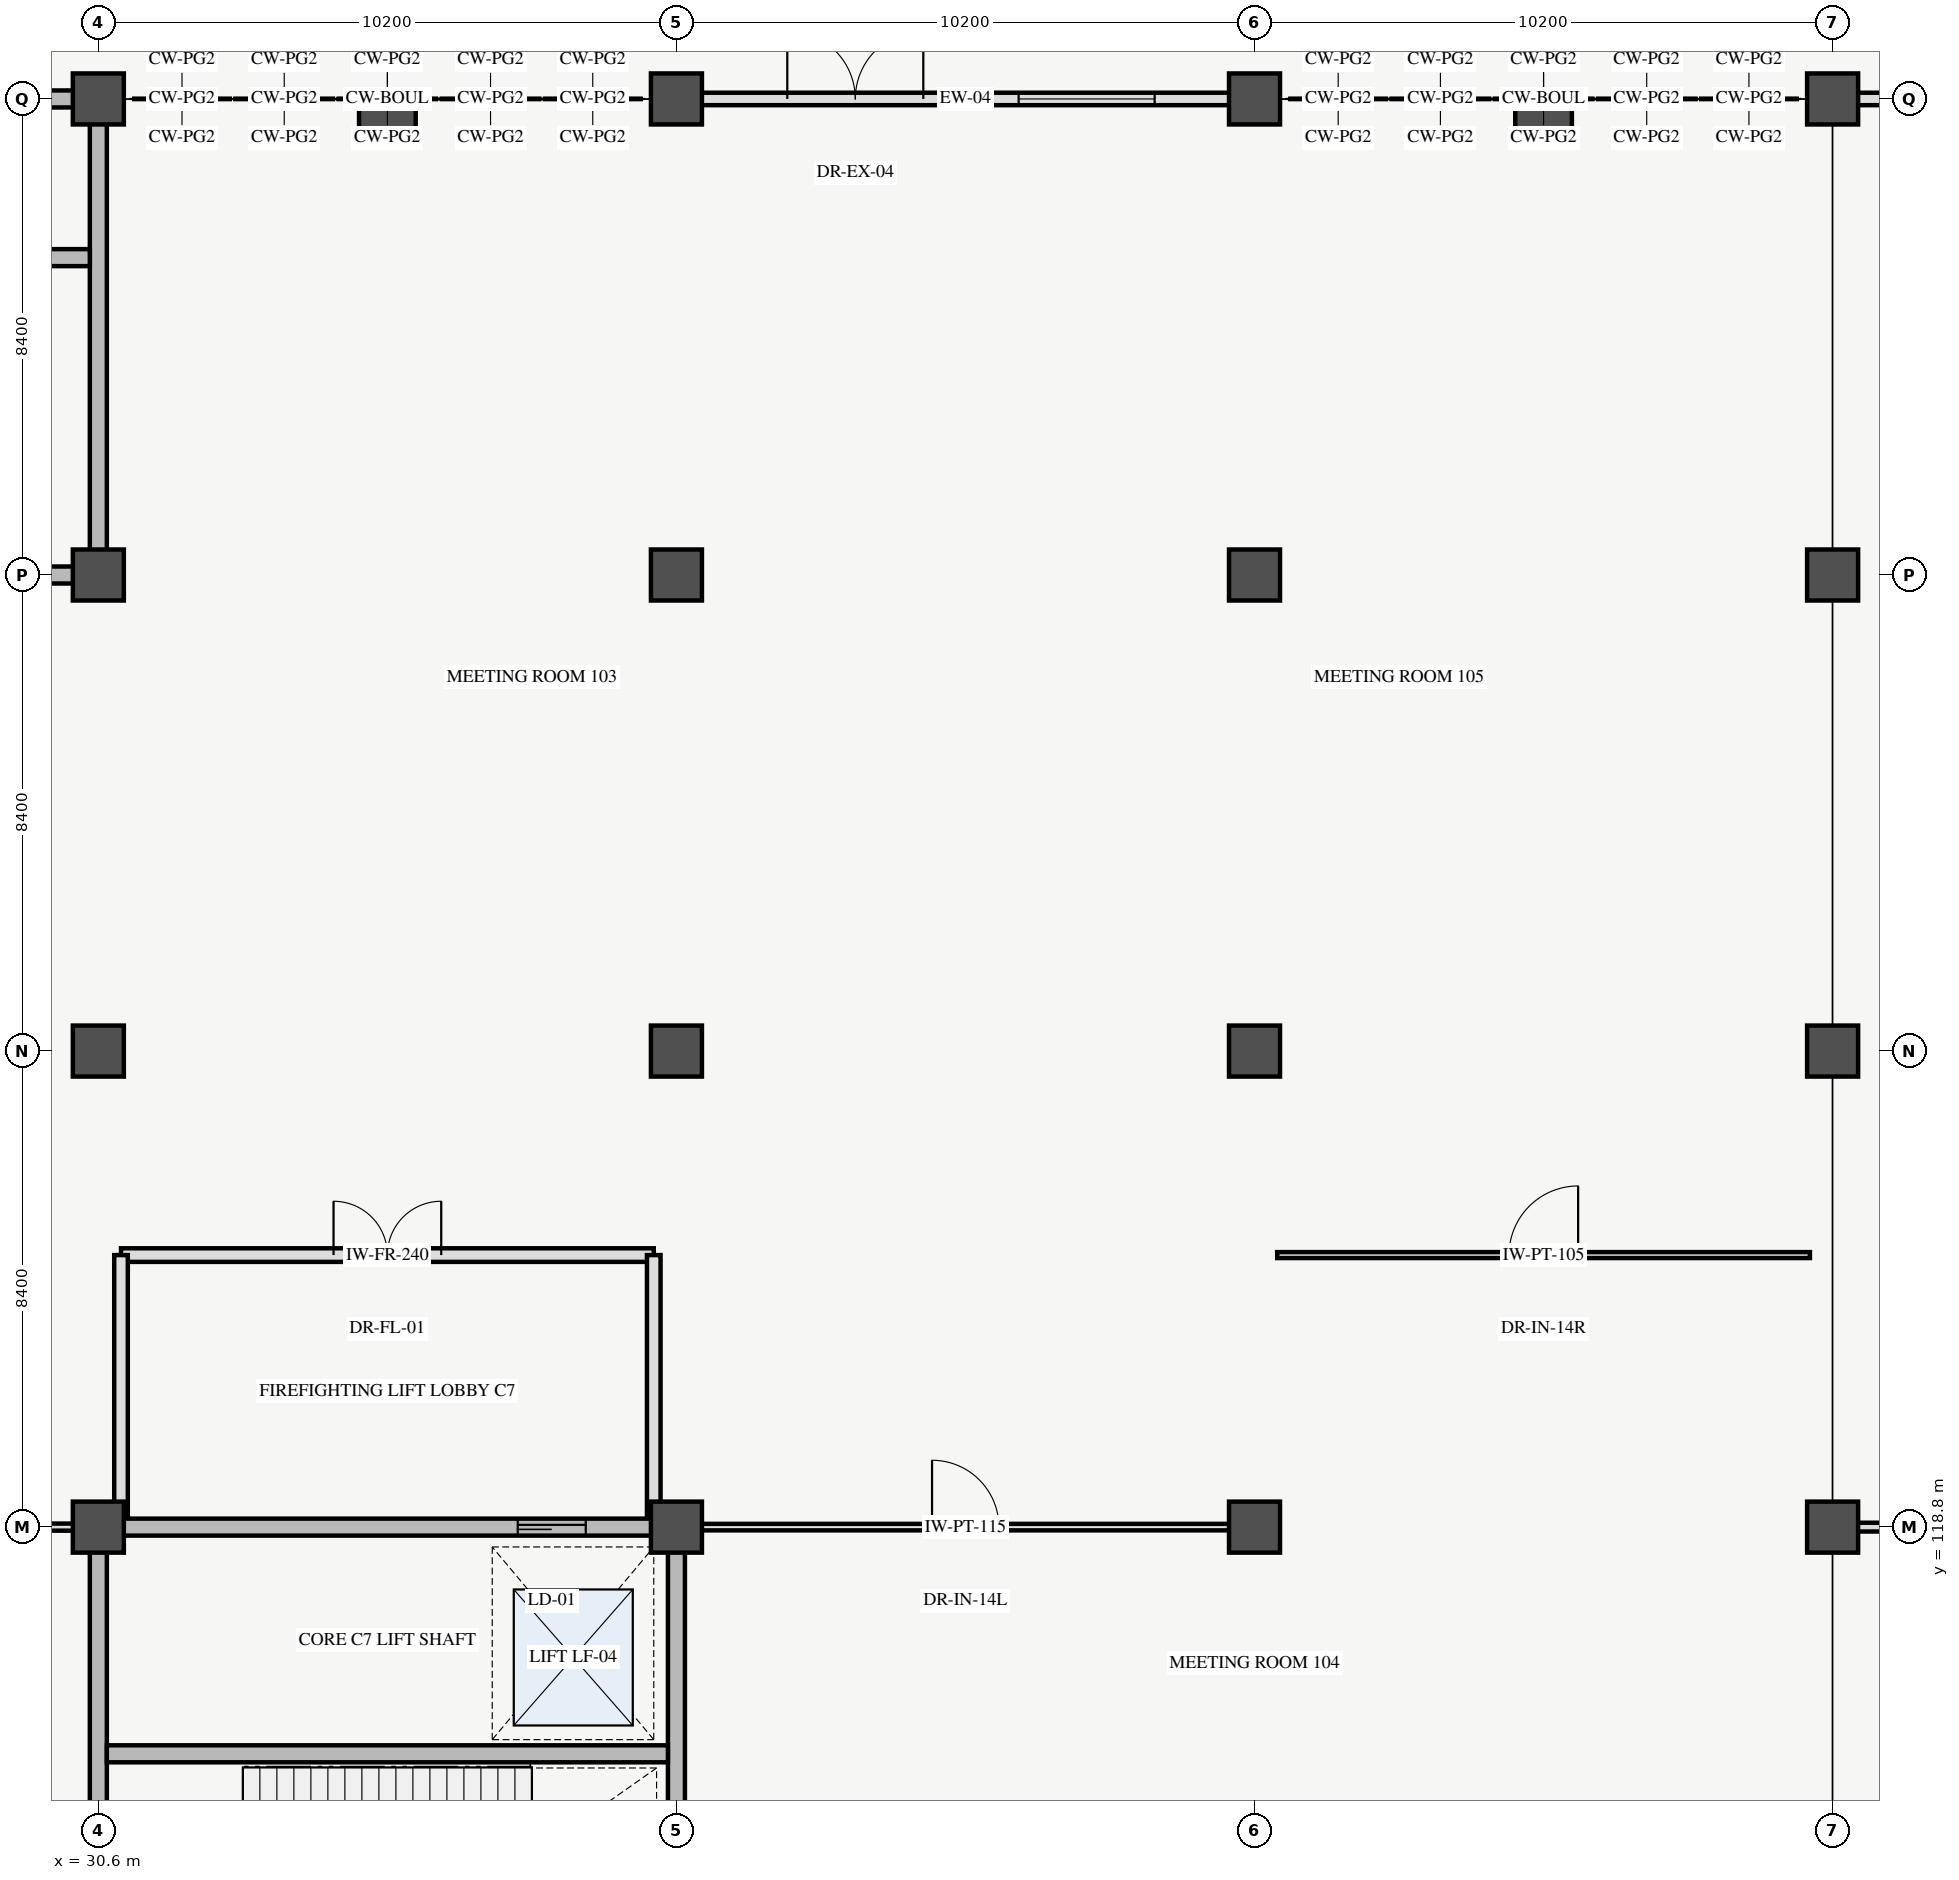
"""IFC4 building model, lengths in metres.
Left out: names, types, materials, properties, quantities, classifications, styles, units other than length and angle.
Written with IfcOpenShell. Run it as: python <this file> out.ifc"""

import sys

from ifc_helpers import new_model, si_unit, direction, frame, frame_2d, origin, origin_2d, place, context, subcontext, project, spatial, rectangle, extrude, element, fill, save


model = new_model("IFC4")
c1 = context("Model", 3, precision=1e-05, world=origin(), true_north=direction((0.0, 1.0)))
c2 = subcontext(c1, "Body", "Model", "MODEL_VIEW")
j1 = project(units=[si_unit("LENGTHUNIT", "METRE"), si_unit("PLANEANGLEUNIT", "RADIAN")], contexts=[c1])
p1 = place(None, origin())
s1 = spatial("IfcSite", under=j1, at=p1, CompositionType="ELEMENT")
p2 = place(p1, origin())
s2 = spatial("IfcBuilding", under=s1, at=p2, CompositionType="ELEMENT")
p3 = place(p2, origin())
s3 = spatial("IfcBuildingStorey", under=s2, at=p3, CompositionType="ELEMENT", Elevation=0.0)
for number, where, z_axis, x_axis in (
    (1, (30.6, 118.8, 0.0), (0.0, 0.0, 1.0), (1.0, 0.0, 0.0)),
    (2, (30.6, 127.2, 0.0), (0.0, 0.0, 1.0), (1.0, 0.0, 0.0)),
    (3, (30.6, 135.6, 0.0), (0.0, 0.0, 1.0), (1.0, 0.0, 0.0)),
    (4, (30.6, 144.0, 0.0), (0.0, 0.0, 1.0), (1.0, 0.0, 0.0)),
    (5, (40.8, 118.8, 0.0), (0.0, 0.0, 1.0), (1.0, 0.0, 0.0)),
    (6, (40.8, 127.2, 0.0), (0.0, 0.0, 1.0), (1.0, 0.0, 0.0)),
    (7, (40.8, 135.6, 0.0), (0.0, 0.0, 1.0), (1.0, 0.0, 0.0)),
    (8, (40.8, 144.0, 0.0), (0.0, 0.0, 1.0), (1.0, 0.0, 0.0)),
    (9, (51.0, 118.8, 0.0), (0.0, 0.0, 1.0), (1.0, 0.0, 0.0)),
    (10, (51.0, 127.2, 0.0), (0.0, 0.0, 1.0), (1.0, 0.0, 0.0)),
    (11, (51.0, 135.6, 0.0), (0.0, 0.0, 1.0), (1.0, 0.0, 0.0)),
    (12, (51.0, 144.0, 0.0), (0.0, 0.0, 1.0), (1.0, 0.0, 0.0)),
    (13, (61.2, 118.8, 0.0), (0.0, 0.0, 1.0), (1.0, 0.0, 0.0)),
    (14, (61.2, 127.2, 0.0), (0.0, 0.0, 1.0), (1.0, 0.0, 0.0)),
    (15, (61.2, 135.6, 0.0), (0.0, 0.0, 1.0), (1.0, 0.0, 0.0)),
    (16, (61.2, 144.0, 0.0), (0.0, 0.0, 1.0), (1.0, 0.0, 0.0)),
):
    element("IfcColumn", number, at=place(p3, frame(where, z_axis=z_axis, x_axis=x_axis)), inside=s3, PredefinedType="COLUMN", context=c2, shape_type="SweptSolid", body=[
        extrude(rectangle(XDim=0.9, YDim=0.9, at=origin_2d()), origin(), (0.0, 0.0, 1.0), 5.4),
    ])
for number, where, z_axis, x_axis in (
    (17, (35.7, 143.7, 0.0), (0.0, 0.0, 1.0), (1.0, 0.0, 0.0)),
    (18, (56.1, 143.7, 0.0), (0.0, 0.0, 1.0), (1.0, 0.0, 0.0)),
):
    element("IfcColumn", number, at=place(p3, frame(where, z_axis=z_axis, x_axis=x_axis)), inside=s3, PredefinedType="PILASTER", context=c2, shape_type="SweptSolid", body=[
        extrude(rectangle(XDim=1.0, YDim=0.6, at=origin_2d()), origin(), (0.0, 0.0, 1.0), 5.4),
    ])
p4 = place(p3, frame((30.6, 118.8, 0.0), z_axis=(0.0, 0.0, 1.0), x_axis=(1.0, 0.0, 0.0)))
e19 = element("IfcWall", 19, at=p4, inside=s3, PredefinedType="SHEAR", context=c2, shape_type="SweptSolid", body=[
    extrude(rectangle(XDim=10.2, YDim=0.3, at=frame_2d((5.1, 0.0))), origin(), (0.0, 0.0, 1.0), 5.4),
])
p5 = place(p4, frame((7.4, 0.0, 0.0)))
e20 = element("IfcOpeningElement", 20, at=p5, cuts=e19, PredefinedType="OPENING", context=c2, shape_type="SweptSolid", body=[
    extrude(rectangle(XDim=1.2, YDim=2.25, at=frame_2d((0.6, 1.125))), frame((0.0, 0.16, 0.0), z_axis=(0.0, -1.0, 0.0), x_axis=(1.0, 0.0, 0.0)), (0.0, 0.0, 1.0), 0.32),
])
for number, where, z_axis, x_axis in (
    (21, (30.6, 109.2, 0.0), (0.0, 0.0, 1.0), (0.0, 1.0, 0.0)),
    (22, (40.8, 109.2, 0.0), (0.0, 0.0, 1.0), (0.0, 1.0, 0.0)),
):
    element("IfcWall", number, at=place(p3, frame(where, z_axis=z_axis, x_axis=x_axis)), inside=s3, PredefinedType="SHEAR", context=c2, shape_type="SweptSolid", body=[
        extrude(rectangle(XDim=9.6, YDim=0.3, at=frame_2d((4.8, 0.0))), origin(), (0.0, 0.0, 1.0), 5.4),
    ])
p6 = place(p3, frame((41.04, 144.0, 0.0), z_axis=(0.0, 0.0, 1.0), x_axis=(1.0, 0.0, 0.0)))
e23 = element("IfcWall", 23, at=p6, inside=s3, PredefinedType="STANDARD", context=c2, shape_type="SweptSolid", body=[
    extrude(rectangle(XDim=9.72, YDim=0.22, at=frame_2d((4.86, 0.0))), origin(), (0.0, 0.0, 1.0), 3.68),
])
p7 = place(p6, frame((1.716, 0.0, 0.0)))
e24 = element("IfcOpeningElement", 24, at=p7, cuts=e23, PredefinedType="OPENING", context=c2, shape_type="SweptSolid", body=[
    extrude(rectangle(XDim=2.4, YDim=2.4, at=frame_2d((1.2, 1.2))), frame((0.0, 0.12, 0.0), z_axis=(0.0, -1.0, 0.0), x_axis=(1.0, 0.0, 0.0)), (0.0, 0.0, 1.0), 0.24),
])
p8 = place(p6, frame((5.798, 0.0, 0.7)))
e25 = element("IfcOpeningElement", 25, at=p8, cuts=e23, PredefinedType="OPENING", context=c2, shape_type="SweptSolid", body=[
    extrude(rectangle(XDim=2.4, YDim=2.1, at=frame_2d((1.2, 1.05))), frame((0.0, 0.12, 0.0), z_axis=(0.0, -1.0, 0.0), x_axis=(1.0, 0.0, 0.0)), (0.0, 0.0, 1.0), 0.24),
])
p9 = place(p3, frame((61.44, 144.0, 0.0), z_axis=(0.0, 0.0, 1.0), x_axis=(1.0, 0.0, 0.0)))
e26 = element("IfcWall", 26, at=p9, inside=s3, PredefinedType="STANDARD", context=c2, shape_type="SweptSolid", body=[
    extrude(rectangle(XDim=9.72, YDim=0.22, at=frame_2d((4.86, 0.0))), origin(), (0.0, 0.0, 1.0), 3.68),
])
p10 = place(p9, frame((1.716, 0.0, 0.0)))
e27 = element("IfcOpeningElement", 27, at=p10, cuts=e26, PredefinedType="OPENING", context=c2, shape_type="SweptSolid", body=[
    extrude(rectangle(XDim=2.4, YDim=2.4, at=frame_2d((1.2, 1.2))), frame((0.0, 0.12, 0.0), z_axis=(0.0, -1.0, 0.0), x_axis=(1.0, 0.0, 0.0)), (0.0, 0.0, 1.0), 0.24),
])
p11 = place(p9, frame((5.798, 0.0, 0.7)))
e28 = element("IfcOpeningElement", 28, at=p11, cuts=e26, PredefinedType="OPENING", context=c2, shape_type="SweptSolid", body=[
    extrude(rectangle(XDim=2.4, YDim=2.1, at=frame_2d((1.2, 1.05))), frame((0.0, 0.12, 0.0), z_axis=(0.0, -1.0, 0.0), x_axis=(1.0, 0.0, 0.0)), (0.0, 0.0, 1.0), 0.24),
])
p12 = place(p3, frame((30.75, 114.8, 0.0), z_axis=(0.0, 0.0, 1.0), x_axis=(1.0, 0.0, 0.0)))
e29 = element("IfcWall", 29, at=p12, inside=s3, PredefinedType="SHEAR", context=c2, shape_type="SweptSolid", body=[
    extrude(rectangle(XDim=9.9, YDim=0.3, at=frame_2d((4.95, 0.0))), origin(), (0.0, 0.0, 1.0), 5.4),
])
p13 = place(p3, frame((20.4, 135.6, 0.0), z_axis=(0.0, 0.0, 1.0), x_axis=(1.0, 0.0, 0.0)))
e30 = element("IfcWall", 30, at=p13, inside=s3, PredefinedType="SHEAR", context=c2, shape_type="SweptSolid", body=[
    extrude(rectangle(XDim=10.2, YDim=0.3, at=frame_2d((5.1, 0.0))), origin(), (0.0, 0.0, 1.0), 5.4),
])
p14 = place(p13, frame((0.92, 0.0, 0.0)))
e31 = element("IfcOpeningElement", 31, at=p14, cuts=e30, PredefinedType="OPENING", context=c2, shape_type="SweptSolid", body=[
    extrude(rectangle(XDim=1.16, YDim=2.2, at=frame_2d((0.58, 1.1))), frame((0.0, 0.16, 0.0), z_axis=(0.0, -1.0, 0.0), x_axis=(1.0, 0.0, 0.0)), (0.0, 0.0, 1.0), 0.32),
])
p15 = place(p3, frame((20.4, 144.0, 0.0), z_axis=(0.0, 0.0, 1.0), x_axis=(1.0, 0.0, 0.0)))
e32 = element("IfcWall", 32, at=p15, inside=s3, PredefinedType="SHEAR", context=c2, shape_type="SweptSolid", body=[
    extrude(rectangle(XDim=10.2, YDim=0.3, at=frame_2d((5.1, 0.0))), origin(), (0.0, 0.0, 1.0), 5.4),
])
p16 = place(p15, frame((0.95, 0.0, 0.0)))
e33 = element("IfcOpeningElement", 33, at=p16, cuts=e32, PredefinedType="OPENING", context=c2, shape_type="SweptSolid", body=[
    extrude(rectangle(XDim=1.2, YDim=2.2, at=frame_2d((0.6, 1.1))), frame((0.0, 0.16, 0.0), z_axis=(0.0, -1.0, 0.0), x_axis=(1.0, 0.0, 0.0)), (0.0, 0.0, 1.0), 0.32),
])
p17 = place(p3, frame((30.6, 135.6, 0.0), z_axis=(0.0, 0.0, 1.0), x_axis=(0.0, 1.0, 0.0)))
e34 = element("IfcWall", 34, at=p17, inside=s3, PredefinedType="SHEAR", context=c2, shape_type="SweptSolid", body=[
    extrude(rectangle(XDim=8.4, YDim=0.3, at=frame_2d((4.2, 0.0))), origin(), (0.0, 0.0, 1.0), 5.4),
])
p18 = place(p3, frame((20.55, 141.2, 0.0), z_axis=(0.0, 0.0, 1.0), x_axis=(1.0, 0.0, 0.0)))
e35 = element("IfcWall", 35, at=p18, inside=s3, PredefinedType="SHEAR", context=c2, shape_type="SweptSolid", body=[
    extrude(rectangle(XDim=9.9, YDim=0.3, at=frame_2d((4.95, 0.0))), origin(), (0.0, 0.0, 1.0), 5.4),
])
p19 = place(p3, frame((31.0, 123.6, 0.0), z_axis=(0.0, 0.0, 1.0), x_axis=(1.0, 0.0, 0.0)))
e36 = element("IfcWall", 36, at=p19, inside=s3, PredefinedType="PARTITIONING", context=c2, shape_type="SweptSolid", body=[
    extrude(rectangle(XDim=9.4, YDim=0.24, at=frame_2d((4.7, 0.0))), origin(), (0.0, 0.0, 1.0), 4.08),
])
p20 = place(p19, frame((3.75, 0.0, 0.0)))
e37 = element("IfcOpeningElement", 37, at=p20, cuts=e36, PredefinedType="OPENING", context=c2, shape_type="SweptSolid", body=[
    extrude(rectangle(XDim=1.9, YDim=2.25, at=frame_2d((0.95, 1.125))), frame((0.0, 0.13, 0.0), z_axis=(0.0, -1.0, 0.0), x_axis=(1.0, 0.0, 0.0)), (0.0, 0.0, 1.0), 0.26),
])
for number, where, z_axis, x_axis in (
    (38, (40.4, 119.0, 0.0), (0.0, 0.0, 1.0), (0.0, 1.0, 0.0)),
    (39, (31.0, 119.0, 0.0), (0.0, 0.0, 1.0), (0.0, 1.0, 0.0)),
):
    element("IfcWall", number, at=place(p3, frame(where, z_axis=z_axis, x_axis=x_axis)), inside=s3, PredefinedType="PARTITIONING", context=c2, shape_type="SweptSolid", body=[
        extrude(rectangle(XDim=4.6, YDim=0.24, at=frame_2d((2.3, 0.0))), origin(), (0.0, 0.0, 1.0), 4.08),
    ])
p21 = place(p3, frame((61.6, 118.8, 0.0), z_axis=(0.0, 0.0, 1.0), x_axis=(1.0, 0.0, 0.0)))
e40 = element("IfcWall", 40, at=p21, inside=s3, PredefinedType="PARTITIONING", context=c2, shape_type="SweptSolid", body=[
    extrude(rectangle(XDim=9.4, YDim=0.155, at=frame_2d((4.7, 0.0))), origin(), (0.0, 0.0, 1.0), 4.08),
])
p22 = place(p21, frame((4.21, 0.0, 0.0)))
e41 = element("IfcOpeningElement", 41, at=p22, cuts=e40, PredefinedType="OPENING", context=c2, shape_type="SweptSolid", body=[
    extrude(rectangle(XDim=0.98, YDim=2.12, at=frame_2d((0.49, 1.06))), frame((0.0, 0.087, 0.0), z_axis=(0.0, -1.0, 0.0), x_axis=(1.0, 0.0, 0.0)), (0.0, 0.0, 1.0), 0.175),
])
p23 = place(p3, frame((20.8, 118.8, 0.0), z_axis=(0.0, 0.0, 1.0), x_axis=(1.0, 0.0, 0.0)))
e42 = element("IfcWall", 42, at=p23, inside=s3, PredefinedType="PARTITIONING", context=c2, shape_type="SweptSolid", body=[
    extrude(rectangle(XDim=9.4, YDim=0.125, at=frame_2d((4.7, 0.0))), origin(), (0.0, 0.0, 1.0), 4.08),
])
p24 = place(p23, frame((4.14, 0.0, 0.0)))
e43 = element("IfcOpeningElement", 43, at=p24, cuts=e42, PredefinedType="OPENING", context=c2, shape_type="SweptSolid", body=[
    extrude(rectangle(XDim=1.12, YDim=2.18, at=frame_2d((0.56, 1.09))), frame((0.0, 0.073, 0.0), z_axis=(0.0, -1.0, 0.0), x_axis=(1.0, 0.0, 0.0)), (0.0, 0.0, 1.0), 0.145),
])
p25 = place(p3, frame((41.2, 118.8, 0.0), z_axis=(0.0, 0.0, 1.0), x_axis=(1.0, 0.0, 0.0)))
e44 = element("IfcWall", 44, at=p25, inside=s3, PredefinedType="PARTITIONING", context=c2, shape_type="SweptSolid", body=[
    extrude(rectangle(XDim=9.4, YDim=0.115, at=frame_2d((4.7, 0.0))), origin(), (0.0, 0.0, 1.0), 4.08),
])
p26 = place(p25, frame((4.11, 0.0, 0.0)))
e45 = element("IfcOpeningElement", 45, at=p26, cuts=e44, PredefinedType="OPENING", context=c2, shape_type="SweptSolid", body=[
    extrude(rectangle(XDim=1.18, YDim=2.22, at=frame_2d((0.59, 1.11))), frame((0.0, 0.067, 0.0), z_axis=(0.0, -1.0, 0.0), x_axis=(1.0, 0.0, 0.0)), (0.0, 0.0, 1.0), 0.135),
])
p27 = place(p3, frame((51.4, 123.6, 0.0), z_axis=(0.0, 0.0, 1.0), x_axis=(1.0, 0.0, 0.0)))
e46 = element("IfcWall", 46, at=p27, inside=s3, PredefinedType="PARTITIONING", context=c2, shape_type="SweptSolid", body=[
    extrude(rectangle(XDim=9.4, YDim=0.105, at=frame_2d((4.7, 0.0))), origin(), (0.0, 0.0, 1.0), 4.08),
])
p28 = place(p27, frame((4.09, 0.0, 0.0)))
e47 = element("IfcOpeningElement", 47, at=p28, cuts=e46, PredefinedType="OPENING", context=c2, shape_type="SweptSolid", body=[
    extrude(rectangle(XDim=1.22, YDim=2.22, at=frame_2d((0.61, 1.11))), frame((0.0, 0.062, 0.0), z_axis=(0.0, -1.0, 0.0), x_axis=(1.0, 0.0, 0.0)), (0.0, 0.0, 1.0), 0.125),
])
p29 = place(p7, origin())
e48 = element("IfcDoor", 48, at=p29, inside=s3, OperationType="DOUBLE_DOOR_SINGLE_SWING", PredefinedType="DOOR", context=c2, shape_type="SweptSolid", body=[
    extrude(rectangle(XDim=2.4, YDim=2.4, at=frame_2d((1.2, 1.2))), frame((0.0, 0.025, 0.0), z_axis=(0.0, -1.0, 0.0), x_axis=(1.0, 0.0, 0.0)), (0.0, 0.0, 1.0), 0.05),
])
fill(e24, e48)
p30 = place(p8, origin())
e49 = element("IfcWindow", 49, at=p30, inside=s3, PartitioningType="DOUBLE_PANEL_VERTICAL", PredefinedType="WINDOW", context=c2, shape_type="SweptSolid", body=[
    extrude(rectangle(XDim=2.4, YDim=2.1, at=frame_2d((1.2, 1.05))), frame((0.0, 0.03, 0.0), z_axis=(0.0, -1.0, 0.0), x_axis=(1.0, 0.0, 0.0)), (0.0, 0.0, 1.0), 0.06),
])
fill(e25, e49)
p31 = place(p5, origin())
e50 = element("IfcDoor", 50, at=p31, inside=s3, OperationType="SLIDING_TO_LEFT", PredefinedType="DOOR", context=c2, shape_type="SweptSolid", body=[
    extrude(rectangle(XDim=1.2, YDim=2.25, at=frame_2d((0.6, 1.125))), frame((0.0, 0.025, 0.0), z_axis=(0.0, -1.0, 0.0), x_axis=(1.0, 0.0, 0.0)), (0.0, 0.0, 1.0), 0.05),
])
fill(e20, e50)
p32 = place(p20, origin())
e51 = element("IfcDoor", 51, at=p32, inside=s3, OperationType="DOUBLE_DOOR_SINGLE_SWING", PredefinedType="DOOR", context=c2, shape_type="SweptSolid", body=[
    extrude(rectangle(XDim=1.9, YDim=2.25, at=frame_2d((0.95, 1.125))), frame((0.0, 0.025, 0.0), z_axis=(0.0, -1.0, 0.0), x_axis=(1.0, 0.0, 0.0)), (0.0, 0.0, 1.0), 0.05),
])
fill(e37, e51)
p33 = place(p26, origin())
e52 = element("IfcDoor", 52, at=p33, inside=s3, OperationType="SINGLE_SWING_LEFT", PredefinedType="DOOR", context=c2, shape_type="SweptSolid", body=[
    extrude(rectangle(XDim=1.18, YDim=2.22, at=frame_2d((0.59, 1.11))), frame((0.0, 0.025, 0.0), z_axis=(0.0, -1.0, 0.0), x_axis=(1.0, 0.0, 0.0)), (0.0, 0.0, 1.0), 0.05),
])
fill(e45, e52)
p34 = place(p28, origin())
e53 = element("IfcDoor", 53, at=p34, inside=s3, OperationType="SINGLE_SWING_RIGHT", PredefinedType="DOOR", context=c2, shape_type="SweptSolid", body=[
    extrude(rectangle(XDim=1.22, YDim=2.22, at=frame_2d((0.61, 1.11))), frame((0.0, 0.025, 0.0), z_axis=(0.0, -1.0, 0.0), x_axis=(1.0, 0.0, 0.0)), (0.0, 0.0, 1.0), 0.05),
])
fill(e47, e53)
save(model, sys.argv[1])
